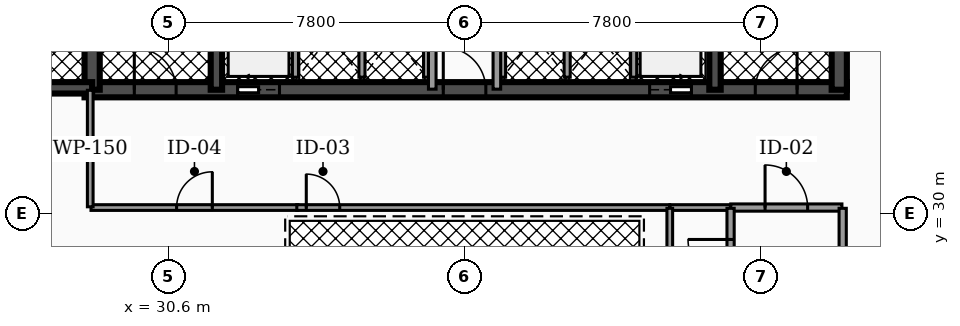
"""IFC4 building model, lengths in metres.
Left out: names, types, materials, properties, quantities, classifications, styles, units other than length and angle.
Written with IfcOpenShell. Run it as: python <this file> out.ifc"""

import sys

from ifc_helpers import new_model, si_unit, direction, frame, frame_2d, origin, place, context, subcontext, project, spatial, rectangle, extrude, element, fill, save


model = new_model("IFC4")
c1 = context("Model", 3, precision=1e-05, world=origin(), true_north=direction((0.0, 1.0)))
c2 = subcontext(c1, "Body", "Model", "MODEL_VIEW")
j1 = project(units=[si_unit("LENGTHUNIT", "METRE"), si_unit("PLANEANGLEUNIT", "RADIAN")], contexts=[c1])
p1 = place(None, origin())
s1 = spatial("IfcSite", under=j1, at=p1, CompositionType="ELEMENT")
p2 = place(p1, origin())
s2 = spatial("IfcBuilding", under=s1, at=p2, CompositionType="ELEMENT")
p3 = place(p2, frame((0.0, 0.0, 72.42)))
s3 = spatial("IfcBuildingStorey", under=s2, at=p3, CompositionType="ELEMENT", Elevation=72.42)
p4 = place(p3, frame((28.4, 33.25, 0.0), z_axis=(0.0, 0.0, 1.0), x_axis=(1.0, 0.0, 0.0)))
e1 = element("IfcWall", 1, at=p4, inside=s3, PredefinedType="SHEAR", context=c2, shape_type="SweptSolid", body=[
    extrude(rectangle(XDim=20.06, YDim=0.4, at=frame_2d((10.03, 0.0))), origin(), (0.0, 0.0, 1.0), 3.82),
])
p5 = place(p4, frame((4.03, 0.0, 0.0)))
e2 = element("IfcOpeningElement", 2, at=p5, cuts=e1, PredefinedType="OPENING", context=c2, shape_type="SweptSolid", body=[
    extrude(rectangle(XDim=1.1, YDim=2.15, at=frame_2d((0.55, 1.075))), frame((0.0, 0.21, 0.0), z_axis=(0.0, -1.0, 0.0), x_axis=(1.0, 0.0, 0.0)), (0.0, 0.0, 1.0), 0.42),
])
p6 = place(p4, frame((14.87, 0.0, 0.0)))
e3 = element("IfcOpeningElement", 3, at=p6, cuts=e1, PredefinedType="OPENING", context=c2, shape_type="SweptSolid", body=[
    extrude(rectangle(XDim=1.1, YDim=2.15, at=frame_2d((0.55, 1.075))), frame((0.0, 0.21, 0.0), z_axis=(0.0, -1.0, 0.0), x_axis=(1.0, 0.0, 0.0)), (0.0, 0.0, 1.0), 0.42),
])
p7 = place(p4, frame((1.31, 0.0, 0.0)))
e4 = element("IfcOpeningElement", 4, at=p7, cuts=e1, PredefinedType="OPENING", context=c2, shape_type="SweptSolid", body=[
    extrude(rectangle(XDim=1.1, YDim=2.2, at=frame_2d((0.55, 1.1))), frame((0.0, 0.21, 0.0), z_axis=(0.0, -1.0, 0.0), x_axis=(1.0, 0.0, 0.0)), (0.0, 0.0, 1.0), 0.42),
])
p8 = place(p4, frame((9.44, 0.0, 0.0)))
e5 = element("IfcOpeningElement", 5, at=p8, cuts=e1, PredefinedType="OPENING", context=c2, shape_type="SweptSolid", body=[
    extrude(rectangle(XDim=1.12, YDim=2.05, at=frame_2d((0.56, 1.025))), frame((0.0, 0.21, 0.0), z_axis=(0.0, -1.0, 0.0), x_axis=(1.0, 0.0, 0.0)), (0.0, 0.0, 1.0), 0.42),
])
p9 = place(p4, frame((17.65, 0.0, 0.0)))
e6 = element("IfcOpeningElement", 6, at=p9, cuts=e1, PredefinedType="OPENING", context=c2, shape_type="SweptSolid", body=[
    extrude(rectangle(XDim=1.1, YDim=2.2, at=frame_2d((0.55, 1.1))), frame((0.0, 0.21, 0.0), z_axis=(0.0, -1.0, 0.0), x_axis=(1.0, 0.0, 0.0)), (0.0, 0.0, 1.0), 0.42),
])
p10 = place(p3, frame((28.6, 33.25, 0.0), z_axis=(0.0, 0.0, 1.0), x_axis=(0.0, 1.0, 0.0)))
e7 = element("IfcWall", 7, at=p10, inside=s3, PredefinedType="SHEAR", context=c2, shape_type="SweptSolid", body=[
    extrude(rectangle(XDim=10.2, YDim=0.4, at=frame_2d((5.1, 0.0))), origin(), (0.0, 0.0, 1.0), 3.82),
])
for number, where, z_axis, x_axis in (
    (8, (31.87, 33.25, 0.0), (0.0, 0.0, 1.0), (0.0, 1.0, 0.0)),
    (9, (44.99, 33.25, 0.0), (0.0, 0.0, 1.0), (0.0, 1.0, 0.0)),
):
    element("IfcWall", number, at=place(p3, frame(where, z_axis=z_axis, x_axis=x_axis)), inside=s3, PredefinedType="SHEAR", context=c2, shape_type="SweptSolid", body=[
        extrude(rectangle(XDim=10.2, YDim=0.3, at=frame_2d((5.1, 0.0))), origin(), (0.0, 0.0, 1.0), 3.82),
    ])
p11 = place(p3, frame((48.26, 33.25, 0.0), z_axis=(0.0, 0.0, 1.0), x_axis=(0.0, 1.0, 0.0)))
e10 = element("IfcWall", 10, at=p11, inside=s3, PredefinedType="SHEAR", context=c2, shape_type="SweptSolid", body=[
    extrude(rectangle(XDim=10.2, YDim=0.4, at=frame_2d((5.1, 0.0))), origin(), (0.0, 0.0, 1.0), 3.82),
])
p12 = place(p3, frame((25.08, 33.3, 0.0), z_axis=(0.0, 0.0, 1.0), x_axis=(1.0, 0.0, 0.0)))
e11 = element("IfcWall", 11, at=p12, inside=s3, PredefinedType="SHEAR", context=c2, shape_type="SweptSolid", body=[
    extrude(rectangle(XDim=3.52, YDim=0.3, at=frame_2d((1.76, 0.0))), origin(), (0.0, 0.0, 1.0), 3.82),
])
p13 = place(p12, frame((1.335, 0.0, 0.0)))
e12 = element("IfcOpeningElement", 12, at=p13, cuts=e11, PredefinedType="OPENING", context=c2, shape_type="SweptSolid", body=[
    extrude(rectangle(XDim=0.95, YDim=2.2, at=frame_2d((0.475, 1.1))), frame((0.0, 0.16, 0.0), z_axis=(0.0, -1.0, 0.0), x_axis=(1.0, 0.0, 0.0)), (0.0, 0.0, 1.0), 0.32),
])
for number, where, z_axis, x_axis in (
    (13, (33.95, 33.58, 0.0), (0.0, 0.0, 1.0), (0.0, 1.0, 0.0)),
    (14, (42.85, 33.58, 0.0), (0.0, 0.0, 1.0), (0.0, 1.0, 0.0)),
):
    element("IfcWall", number, at=place(p3, frame(where, z_axis=z_axis, x_axis=x_axis)), inside=s3, PredefinedType="SOLIDWALL", context=c2, shape_type="SweptSolid", body=[
        extrude(rectangle(XDim=2.45, YDim=0.16, at=frame_2d((1.225, 0.0))), origin(), (0.0, 0.0, 1.0), 2.792),
    ])
for number, where, z_axis, x_axis in (
    (15, (35.7, 33.58, 0.0), (0.0, 0.0, 1.0), (0.0, 1.0, 0.0)),
    (16, (37.4, 33.58, 0.0), (0.0, 0.0, 1.0), (0.0, 1.0, 0.0)),
    (17, (39.4, 33.58, 0.0), (0.0, 0.0, 1.0), (0.0, 1.0, 0.0)),
    (18, (41.1, 33.58, 0.0), (0.0, 0.0, 1.0), (0.0, 1.0, 0.0)),
):
    element("IfcWall", number, at=place(p3, frame(where, z_axis=z_axis, x_axis=x_axis)), inside=s3, PredefinedType="SOLIDWALL", context=c2, shape_type="SweptSolid", body=[
        extrude(rectangle(XDim=2.25, YDim=0.16, at=frame_2d((1.125, 0.0))), origin(), (0.0, 0.0, 1.0), 2.792),
    ])
p14 = place(p3, frame((37.55, 33.265, 0.0), z_axis=(0.0, 0.0, 1.0), x_axis=(0.0, 1.0, 0.0)))
e19 = element("IfcWall", 19, at=p14, inside=s3, PredefinedType="PARTITIONING", context=c2, shape_type="SweptSolid", body=[
    extrude(rectangle(XDim=4.265, YDim=0.2, at=frame_2d((2.133, 0.0))), origin(), (0.0, 0.0, 1.0), 2.777),
])
p15 = place(p14, frame((3.093, 0.0, 0.0)))
e20 = element("IfcOpeningElement", 20, at=p15, cuts=e19, PredefinedType="OPENING", context=c2, shape_type="SweptSolid", body=[
    extrude(rectangle(XDim=0.88, YDim=2.05, at=frame_2d((0.44, 1.025))), frame((0.0, 0.11, 0.0), z_axis=(0.0, -1.0, 0.0), x_axis=(1.0, 0.0, 0.0)), (0.0, 0.0, 1.0), 0.22),
])
p16 = place(p3, frame((39.25, 33.265, 0.0), z_axis=(0.0, 0.0, 1.0), x_axis=(0.0, 1.0, 0.0)))
e21 = element("IfcWall", 21, at=p16, inside=s3, PredefinedType="PARTITIONING", context=c2, shape_type="SweptSolid", body=[
    extrude(rectangle(XDim=4.265, YDim=0.2, at=frame_2d((2.133, 0.0))), origin(), (0.0, 0.0, 1.0), 2.777),
])
p17 = place(p16, frame((3.093, 0.0, 0.0)))
e22 = element("IfcOpeningElement", 22, at=p17, cuts=e21, PredefinedType="OPENING", context=c2, shape_type="SweptSolid", body=[
    extrude(rectangle(XDim=0.88, YDim=2.05, at=frame_2d((0.44, 1.025))), frame((0.0, 0.11, 0.0), z_axis=(0.0, -1.0, 0.0), x_axis=(1.0, 0.0, 0.0)), (0.0, 0.0, 1.0), 0.22),
])
p18 = place(p3, frame((45.405, 30.15, 0.0), z_axis=(0.0, 0.0, 1.0), x_axis=(1.0, 0.0, 0.0)))
e23 = element("IfcWall", 23, at=p18, inside=s3, PredefinedType="PARTITIONING", context=c2, shape_type="SweptSolid", body=[
    extrude(rectangle(XDim=2.925, YDim=0.19, at=frame_2d((1.462, 0.0))), origin(), (0.0, 0.0, 1.0), 2.777),
])
p19 = place(p18, frame((0.903, 0.0, 0.0)))
e24 = element("IfcOpeningElement", 24, at=p19, cuts=e23, PredefinedType="OPENING", context=c2, shape_type="SweptSolid", body=[
    extrude(rectangle(XDim=1.12, YDim=2.05, at=frame_2d((0.56, 1.025))), frame((0.0, 0.105, 0.0), z_axis=(0.0, -1.0, 0.0), x_axis=(1.0, 0.0, 0.0)), (0.0, 0.0, 1.0), 0.21),
])
p20 = place(p3, frame((43.805, 30.15, 0.0), z_axis=(0.0, 0.0, 1.0), x_axis=(1.0, 0.0, 0.0)))
e25 = element("IfcWall", 25, at=p20, inside=s3, PredefinedType="PARTITIONING", context=c2, shape_type="SweptSolid", body=[
    extrude(rectangle(XDim=1.59, YDim=0.15, at=frame_2d((0.795, 0.0))), origin(), (0.0, 0.0, 1.0), 2.777),
])
p21 = place(p3, frame((28.57, 30.15, 0.0), z_axis=(0.0, 0.0, 1.0), x_axis=(1.0, 0.0, 0.0)))
e26 = element("IfcWall", 26, at=p21, inside=s3, PredefinedType="PARTITIONING", context=c2, shape_type="SweptSolid", body=[
    extrude(rectangle(XDim=5.445, YDim=0.15, at=frame_2d((2.722, 0.0))), origin(), (0.0, 0.0, 1.0), 2.777),
])
p22 = place(p21, frame((2.252, 0.0, 0.0)))
e27 = element("IfcOpeningElement", 27, at=p22, cuts=e26, PredefinedType="OPENING", context=c2, shape_type="SweptSolid", body=[
    extrude(rectangle(XDim=0.94, YDim=2.05, at=frame_2d((0.47, 1.025))), frame((0.0, 0.085, 0.0), z_axis=(0.0, -1.0, 0.0), x_axis=(1.0, 0.0, 0.0)), (0.0, 0.0, 1.0), 0.17),
])
p23 = place(p3, frame((28.55, 30.17, 0.0), z_axis=(0.0, 0.0, 1.0), x_axis=(0.0, 1.0, 0.0)))
e28 = element("IfcWall", 28, at=p23, inside=s3, PredefinedType="PARTITIONING", context=c2, shape_type="SweptSolid", body=[
    extrude(rectangle(XDim=3.065, YDim=0.15, at=frame_2d((1.533, 0.0))), origin(), (0.0, 0.0, 1.0), 2.777),
])
p24 = place(p3, frame((33.985, 30.15, 0.0), z_axis=(0.0, 0.0, 1.0), x_axis=(1.0, 0.0, 0.0)))
e29 = element("IfcWall", 29, at=p24, inside=s3, PredefinedType="PARTITIONING", context=c2, shape_type="SweptSolid", body=[
    extrude(rectangle(XDim=9.81, YDim=0.15, at=frame_2d((4.905, 0.0))), origin(), (0.0, 0.0, 1.0), 2.777),
])
p25 = place(p24, frame((0.25, 0.0, 0.0)))
e30 = element("IfcOpeningElement", 30, at=p25, cuts=e29, PredefinedType="OPENING", context=c2, shape_type="SweptSolid", body=[
    extrude(rectangle(XDim=0.88, YDim=2.05, at=frame_2d((0.44, 1.025))), frame((0.0, 0.085, 0.0), z_axis=(0.0, -1.0, 0.0), x_axis=(1.0, 0.0, 0.0)), (0.0, 0.0, 1.0), 0.17),
])
p26 = place(p3, frame((45.4, 27.37, 0.0), z_axis=(0.0, 0.0, 1.0), x_axis=(0.0, 1.0, 0.0)))
e31 = element("IfcWall", 31, at=p26, inside=s3, PredefinedType="PARTITIONING", context=c2, shape_type="SweptSolid", body=[
    extrude(rectangle(XDim=2.76, YDim=0.19, at=frame_2d((1.38, 0.0))), origin(), (0.0, 0.0, 1.0), 2.777),
])
p27 = place(p26, frame((0.82, 0.0, 0.0)))
e32 = element("IfcOpeningElement", 32, at=p27, cuts=e31, PredefinedType="OPENING", context=c2, shape_type="SweptSolid", body=[
    extrude(rectangle(XDim=1.12, YDim=2.05, at=frame_2d((0.56, 1.025))), frame((0.0, 0.105, 0.0), z_axis=(0.0, -1.0, 0.0), x_axis=(1.0, 0.0, 0.0)), (0.0, 0.0, 1.0), 0.21),
])
p28 = place(p3, frame((48.35, 27.37, 0.0), z_axis=(0.0, 0.0, 1.0), x_axis=(0.0, 1.0, 0.0)))
e33 = element("IfcWall", 33, at=p28, inside=s3, PredefinedType="PARTITIONING", context=c2, shape_type="SweptSolid", body=[
    extrude(rectangle(XDim=2.76, YDim=0.19, at=frame_2d((1.38, 0.0))), origin(), (0.0, 0.0, 1.0), 2.777),
])
p29 = place(p3, frame((43.8, 23.62, 0.0), z_axis=(0.0, 0.0, 1.0), x_axis=(0.0, 1.0, 0.0)))
e34 = element("IfcWall", 34, at=p29, inside=s3, PredefinedType="PARTITIONING", context=c2, shape_type="SweptSolid", body=[
    extrude(rectangle(XDim=6.51, YDim=0.15, at=frame_2d((3.255, 0.0))), origin(), (0.0, 0.0, 1.0), 2.777),
])
p30 = place(p5, origin())
e35 = element("IfcDoor", 35, at=p30, inside=s3, OperationType="SLIDING_TO_LEFT", PredefinedType="DOOR", context=c2, shape_type="SweptSolid", body=[
    extrude(rectangle(XDim=1.1, YDim=2.15, at=frame_2d((0.55, 1.075))), frame((0.0, 0.025, 0.0), z_axis=(0.0, -1.0, 0.0), x_axis=(1.0, 0.0, 0.0)), (0.0, 0.0, 1.0), 0.05),
])
fill(e2, e35)
p31 = place(p6, origin())
e36 = element("IfcDoor", 36, at=p31, inside=s3, OperationType="SLIDING_TO_RIGHT", PredefinedType="DOOR", context=c2, shape_type="SweptSolid", body=[
    extrude(rectangle(XDim=1.1, YDim=2.15, at=frame_2d((0.55, 1.075))), frame((0.0, 0.025, 0.0), z_axis=(0.0, -1.0, 0.0), x_axis=(1.0, 0.0, 0.0)), (0.0, 0.0, 1.0), 0.05),
])
fill(e3, e36)
p32 = place(p7, origin())
e37 = element("IfcDoor", 37, at=p32, inside=s3, OperationType="SINGLE_SWING_LEFT", PredefinedType="DOOR", context=c2, shape_type="SweptSolid", body=[
    extrude(rectangle(XDim=1.1, YDim=2.2, at=frame_2d((0.55, 1.1))), frame((0.0, 0.025, 0.0), z_axis=(0.0, -1.0, 0.0), x_axis=(1.0, 0.0, 0.0)), (0.0, 0.0, 1.0), 0.05),
])
fill(e4, e37)
p33 = place(p8, origin())
e38 = element("IfcDoor", 38, at=p33, inside=s3, OperationType="SINGLE_SWING_LEFT", PredefinedType="DOOR", context=c2, shape_type="SweptSolid", body=[
    extrude(rectangle(XDim=1.12, YDim=2.05, at=frame_2d((0.56, 1.025))), frame((0.0, 0.025, 0.0), z_axis=(0.0, -1.0, 0.0), x_axis=(1.0, 0.0, 0.0)), (0.0, 0.0, 1.0), 0.05),
])
fill(e5, e38)
p34 = place(p9, origin())
e39 = element("IfcDoor", 39, at=p34, inside=s3, OperationType="SINGLE_SWING_RIGHT", PredefinedType="DOOR", context=c2, shape_type="SweptSolid", body=[
    extrude(rectangle(XDim=1.1, YDim=2.2, at=frame_2d((0.55, 1.1))), frame((0.0, 0.025, 0.0), z_axis=(0.0, -1.0, 0.0), x_axis=(1.0, 0.0, 0.0)), (0.0, 0.0, 1.0), 0.05),
])
fill(e6, e39)
p35 = place(p19, origin())
e40 = element("IfcDoor", 40, at=p35, inside=s3, OperationType="SINGLE_SWING_LEFT", PredefinedType="DOOR", context=c2, shape_type="SweptSolid", body=[
    extrude(rectangle(XDim=1.12, YDim=2.05, at=frame_2d((0.56, 1.025))), frame((0.0, 0.025, 0.0), z_axis=(0.0, -1.0, 0.0), x_axis=(1.0, 0.0, 0.0)), (0.0, 0.0, 1.0), 0.05),
])
fill(e24, e40)
p36 = place(p22, origin())
e41 = element("IfcDoor", 41, at=p36, inside=s3, OperationType="SINGLE_SWING_RIGHT", PredefinedType="DOOR", context=c2, shape_type="SweptSolid", body=[
    extrude(rectangle(XDim=0.94, YDim=2.05, at=frame_2d((0.47, 1.025))), frame((0.0, 0.025, 0.0), z_axis=(0.0, -1.0, 0.0), x_axis=(1.0, 0.0, 0.0)), (0.0, 0.0, 1.0), 0.05),
])
fill(e27, e41)
p37 = place(p25, origin())
e42 = element("IfcDoor", 42, at=p37, inside=s3, OperationType="SINGLE_SWING_LEFT", PredefinedType="DOOR", context=c2, shape_type="SweptSolid", body=[
    extrude(rectangle(XDim=0.88, YDim=2.05, at=frame_2d((0.44, 1.025))), frame((0.0, 0.025, 0.0), z_axis=(0.0, -1.0, 0.0), x_axis=(1.0, 0.0, 0.0)), (0.0, 0.0, 1.0), 0.05),
])
fill(e30, e42)
p38 = place(p27, origin())
e43 = element("IfcDoor", 43, at=p38, inside=s3, OperationType="SINGLE_SWING_RIGHT", PredefinedType="DOOR", context=c2, shape_type="SweptSolid", body=[
    extrude(rectangle(XDim=1.12, YDim=2.05, at=frame_2d((0.56, 1.025))), frame((0.0, 0.025, 0.0), z_axis=(0.0, -1.0, 0.0), x_axis=(1.0, 0.0, 0.0)), (0.0, 0.0, 1.0), 0.05),
])
fill(e32, e43)
save(model, sys.argv[1])
